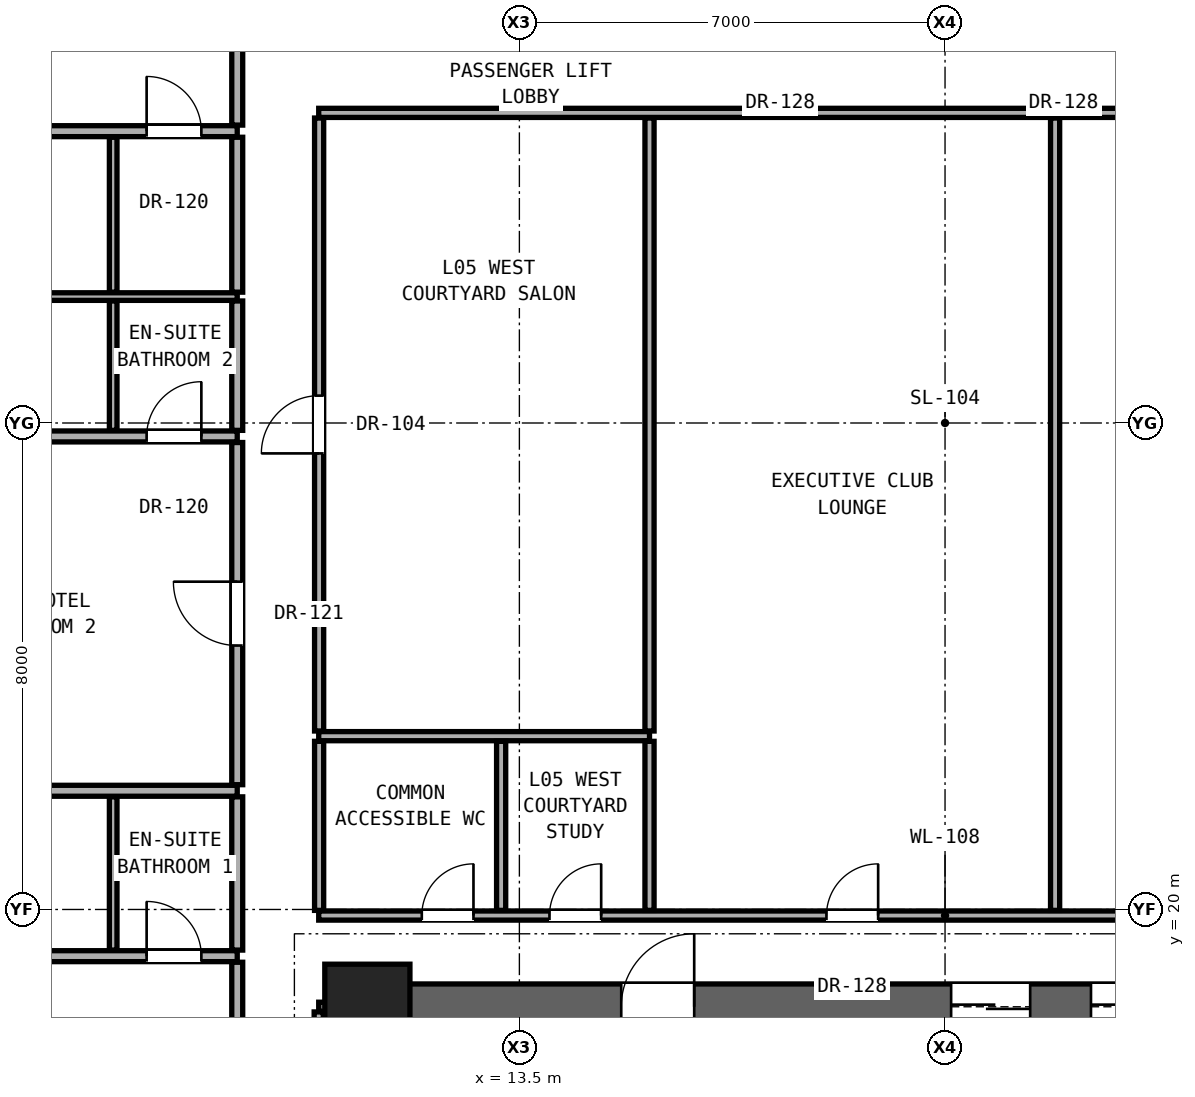
"""IFC4 building model, lengths in metres.
Left out: names, types, materials, properties, quantities, classifications, styles, units other than length and angle.
Written with IfcOpenShell. Run it as: python <this file> out.ifc"""

import sys

from ifc_helpers import new_model, si_unit, direction, frame, frame_2d, origin, origin_2d, place, context, subcontext, project, spatial, rectangle, extrude, element, fill, save


model = new_model("IFC4")
c1 = context("Model", 3, precision=1e-05, world=origin(), true_north=direction((0.0, 1.0)))
c2 = subcontext(c1, "Body", "Model", "MODEL_VIEW")
j1 = project(units=[si_unit("LENGTHUNIT", "METRE"), si_unit("PLANEANGLEUNIT", "RADIAN")], contexts=[c1])
p1 = place(None, origin())
s1 = spatial("IfcSite", under=j1, at=p1, CompositionType="ELEMENT")
p2 = place(p1, origin())
s2 = spatial("IfcBuilding", under=s1, at=p2, CompositionType="ELEMENT")
p3 = place(p2, frame((0.0, 0.0, 22.4)))
s3 = spatial("IfcBuildingStorey", under=s2, at=p3, CompositionType="ELEMENT", Elevation=22.4)
p4 = place(p3, frame((11.0, 18.4, 0.0), z_axis=(0.0, 0.0, 1.0), x_axis=(1.0, 0.0, 0.0)))
e1 = element("IfcColumn", 1, at=p4, inside=s3, PredefinedType="COLUMN", context=c2, shape_type="SweptSolid", body=[
    extrude(rectangle(XDim=1.4, YDim=1.4, at=origin_2d()), origin(), (0.0, 0.0, 1.0), 3.3),
])
p5 = place(p3, frame((11.0, 12.4, 0.0), z_axis=(0.0, 0.0, 1.0), x_axis=(0.0, 1.0, 0.0)))
e2 = element("IfcWall", 2, at=p5, inside=s3, PredefinedType="SHEAR", context=c2, shape_type="SweptSolid", body=[
    extrude(rectangle(XDim=6.0, YDim=0.75, at=frame_2d((3.0, 0.0))), origin(), (0.0, 0.0, 1.0), 3.06),
])
p6 = place(p3, frame((11.0, 18.4, 0.0), z_axis=(0.0, 0.0, 1.0), x_axis=(1.0, 0.0, 0.0)))
e3 = element("IfcWall", 3, at=p6, inside=s3, PredefinedType="SHEAR", context=c2, shape_type="SweptSolid", body=[
    extrude(rectangle(XDim=19.0, YDim=0.75, at=frame_2d((9.5, 0.0))), origin(), (0.0, 0.0, 1.0), 3.06),
])
p7 = place(p6, frame((4.175, 0.0, 0.0)))
e4 = element("IfcOpeningElement", 4, at=p7, cuts=e3, PredefinedType="OPENING", context=c2, shape_type="SweptSolid", body=[
    extrude(rectangle(XDim=1.2, YDim=2.25, at=frame_2d((0.6, 1.125))), frame((0.0, 0.385, 0.0), z_axis=(0.0, -1.0, 0.0), x_axis=(1.0, 0.0, 0.0)), (0.0, 0.0, 1.0), 0.77),
])
p8 = place(p6, frame((9.6, 0.0, 0.0)))
e5 = element("IfcOpeningElement", 5, at=p8, cuts=e3, PredefinedType="OPENING", context=c2, shape_type="SweptSolid", body=[
    extrude(rectangle(XDim=1.3, YDim=2.3, at=frame_2d((0.65, 1.15))), frame((0.0, 0.385, 0.0), z_axis=(0.0, -1.0, 0.0), x_axis=(1.0, 0.0, 0.0)), (0.0, 0.0, 1.0), 0.77),
])
p9 = place(p6, frame((11.9, 0.0, 0.0)))
e6 = element("IfcOpeningElement", 6, at=p9, cuts=e3, PredefinedType="OPENING", context=c2, shape_type="SweptSolid", body=[
    extrude(rectangle(XDim=1.3, YDim=2.3, at=frame_2d((0.65, 1.15))), frame((0.0, 0.385, 0.0), z_axis=(0.0, -1.0, 0.0), x_axis=(1.0, 0.0, 0.0)), (0.0, 0.0, 1.0), 0.77),
])
p10 = place(p6, frame((14.3, 0.0, 0.0)))
e7 = element("IfcOpeningElement", 7, at=p10, cuts=e3, PredefinedType="OPENING", context=c2, shape_type="SweptSolid", body=[
    extrude(rectangle(XDim=1.3, YDim=2.3, at=frame_2d((0.65, 1.15))), frame((0.0, 0.385, 0.0), z_axis=(0.0, -1.0, 0.0), x_axis=(1.0, 0.0, 0.0)), (0.0, 0.0, 1.0), 0.77),
])
p11 = place(p6, frame((16.6, 0.0, 0.0)))
e8 = element("IfcOpeningElement", 8, at=p11, cuts=e3, PredefinedType="OPENING", context=c2, shape_type="SweptSolid", body=[
    extrude(rectangle(XDim=1.3, YDim=2.3, at=frame_2d((0.65, 1.15))), frame((0.0, 0.385, 0.0), z_axis=(0.0, -1.0, 0.0), x_axis=(1.0, 0.0, 0.0)), (0.0, 0.0, 1.0), 0.77),
])
p12 = place(p3, frame((10.2, 18.4, 0.0), z_axis=(0.0, 0.0, 1.0), x_axis=(1.0, 0.0, 0.0)))
e9 = element("IfcWall", 9, at=p12, inside=s3, PredefinedType="PARTITIONING", context=c2, shape_type="SweptSolid", body=[
    extrude(rectangle(XDim=0.43, YDim=0.15, at=frame_2d((0.215, 0.0))), origin(), (0.0, 0.0, 1.0), 2.436),
])
p13 = place(p3, frame((-0.48, 19.232, 0.0), z_axis=(0.0, 0.0, 1.0), x_axis=(1.0, 0.0, 0.0)))
e10 = element("IfcWall", 10, at=p13, inside=s3, PredefinedType="PARTITIONING", context=c2, shape_type="SweptSolid", body=[
    extrude(rectangle(XDim=9.34, YDim=0.18, at=frame_2d((4.67, 0.0))), origin(), (0.0, 0.0, 1.0), 2.125),
])
p14 = place(p13, frame((3.545, 0.0, 0.0)))
e11 = element("IfcOpeningElement", 11, at=p14, cuts=e10, PredefinedType="OPENING", context=c2, shape_type="SweptSolid", body=[
    extrude(rectangle(XDim=0.85, YDim=2.01, at=frame_2d((0.425, 1.005))), frame((0.0, 0.1, 0.0), z_axis=(0.0, -1.0, 0.0), x_axis=(1.0, 0.0, 0.0)), (0.0, 0.0, 1.0), 0.2),
])
p15 = place(p13, frame((7.85, 0.0, 0.0)))
e12 = element("IfcOpeningElement", 12, at=p15, cuts=e10, PredefinedType="OPENING", context=c2, shape_type="SweptSolid", body=[
    extrude(rectangle(XDim=0.9, YDim=2.1, at=frame_2d((0.45, 1.05))), frame((0.0, 0.1, 0.0), z_axis=(0.0, -1.0, 0.0), x_axis=(1.0, 0.0, 0.0)), (0.0, 0.0, 1.0), 0.2),
])
p16 = place(p3, frame((10.2, 19.9, 0.0), z_axis=(0.0, 0.0, 1.0), x_axis=(1.0, 0.0, 0.0)))
e13 = element("IfcWall", 13, at=p16, inside=s3, PredefinedType="PARTITIONING", context=c2, shape_type="SweptSolid", body=[
    extrude(rectangle(XDim=20.6, YDim=0.15, at=frame_2d((10.3, 0.0))), origin(), (0.0, 0.0, 1.0), 2.104),
])
p17 = place(p16, frame((1.695, 0.0, 0.0)))
e14 = element("IfcOpeningElement", 14, at=p17, cuts=e13, PredefinedType="OPENING", context=c2, shape_type="SweptSolid", body=[
    extrude(rectangle(XDim=0.85, YDim=2.01, at=frame_2d((0.425, 1.005))), frame((0.0, 0.085, 0.0), z_axis=(0.0, -1.0, 0.0), x_axis=(1.0, 0.0, 0.0)), (0.0, 0.0, 1.0), 0.17),
])
p18 = place(p16, frame((3.795, 0.0, 0.0)))
e15 = element("IfcOpeningElement", 15, at=p18, cuts=e13, PredefinedType="OPENING", context=c2, shape_type="SweptSolid", body=[
    extrude(rectangle(XDim=0.85, YDim=2.01, at=frame_2d((0.425, 1.005))), frame((0.0, 0.085, 0.0), z_axis=(0.0, -1.0, 0.0), x_axis=(1.0, 0.0, 0.0)), (0.0, 0.0, 1.0), 0.17),
])
p19 = place(p16, frame((8.35, 0.0, 0.0)))
e16 = element("IfcOpeningElement", 16, at=p19, cuts=e13, PredefinedType="OPENING", context=c2, shape_type="SweptSolid", body=[
    extrude(rectangle(XDim=0.85, YDim=2.01, at=frame_2d((0.425, 1.005))), frame((0.0, 0.085, 0.0), z_axis=(0.0, -1.0, 0.0), x_axis=(1.0, 0.0, 0.0)), (0.0, 0.0, 1.0), 0.17),
])
p20 = place(p3, frame((-0.48, 21.952, 0.0), z_axis=(0.0, 0.0, 1.0), x_axis=(1.0, 0.0, 0.0)))
e17 = element("IfcWall", 17, at=p20, inside=s3, PredefinedType="PARTITIONING", context=c2, shape_type="SweptSolid", body=[
    extrude(rectangle(XDim=9.34, YDim=0.18, at=frame_2d((4.67, 0.0))), origin(), (0.0, 0.0, 1.0), 2.125),
])
p21 = place(p3, frame((10.2, 22.85, 0.0), z_axis=(0.0, 0.0, 1.0), x_axis=(1.0, 0.0, 0.0)))
e18 = element("IfcWall", 18, at=p21, inside=s3, PredefinedType="PARTITIONING", context=c2, shape_type="SweptSolid", body=[
    extrude(rectangle(XDim=5.44, YDim=0.15, at=frame_2d((2.72, 0.0))), origin(), (0.0, 0.0, 1.0), 2.104),
])
p22 = place(p3, frame((-0.48, 27.779, 0.0), z_axis=(0.0, 0.0, 1.0), x_axis=(1.0, 0.0, 0.0)))
e19 = element("IfcWall", 19, at=p22, inside=s3, PredefinedType="PARTITIONING", context=c2, shape_type="SweptSolid", body=[
    extrude(rectangle(XDim=9.34, YDim=0.18, at=frame_2d((4.67, 0.0))), origin(), (0.0, 0.0, 1.0), 2.125),
])
p23 = place(p22, frame((3.245, 0.0, 0.0)))
e20 = element("IfcOpeningElement", 20, at=p23, cuts=e19, PredefinedType="OPENING", context=c2, shape_type="SweptSolid", body=[
    extrude(rectangle(XDim=0.85, YDim=2.01, at=frame_2d((0.425, 1.005))), frame((0.0, 0.1, 0.0), z_axis=(0.0, -1.0, 0.0), x_axis=(1.0, 0.0, 0.0)), (0.0, 0.0, 1.0), 0.2),
])
p24 = place(p22, frame((7.85, 0.0, 0.0)))
e21 = element("IfcOpeningElement", 21, at=p24, cuts=e19, PredefinedType="OPENING", context=c2, shape_type="SweptSolid", body=[
    extrude(rectangle(XDim=0.9, YDim=2.1, at=frame_2d((0.45, 1.05))), frame((0.0, 0.1, 0.0), z_axis=(0.0, -1.0, 0.0), x_axis=(1.0, 0.0, 0.0)), (0.0, 0.0, 1.0), 0.2),
])
p25 = place(p3, frame((-0.48, 30.079, 0.0), z_axis=(0.0, 0.0, 1.0), x_axis=(1.0, 0.0, 0.0)))
e22 = element("IfcWall", 22, at=p25, inside=s3, PredefinedType="PARTITIONING", context=c2, shape_type="SweptSolid", body=[
    extrude(rectangle(XDim=9.34, YDim=0.125, at=frame_2d((4.67, 0.0))), origin(), (0.0, 0.0, 1.0), 2.125),
])
p26 = place(p3, frame((-0.48, 32.799, 0.0), z_axis=(0.0, 0.0, 1.0), x_axis=(1.0, 0.0, 0.0)))
e23 = element("IfcWall", 23, at=p26, inside=s3, PredefinedType="PARTITIONING", context=c2, shape_type="SweptSolid", body=[
    extrude(rectangle(XDim=9.34, YDim=0.18, at=frame_2d((4.67, 0.0))), origin(), (0.0, 0.0, 1.0), 2.125),
])
p27 = place(p26, frame((3.545, 0.0, 0.0)))
e24 = element("IfcOpeningElement", 24, at=p27, cuts=e23, PredefinedType="OPENING", context=c2, shape_type="SweptSolid", body=[
    extrude(rectangle(XDim=0.85, YDim=2.01, at=frame_2d((0.425, 1.005))), frame((0.0, 0.1, 0.0), z_axis=(0.0, -1.0, 0.0), x_axis=(1.0, 0.0, 0.0)), (0.0, 0.0, 1.0), 0.2),
])
p28 = place(p26, frame((7.85, 0.0, 0.0)))
e25 = element("IfcOpeningElement", 25, at=p28, cuts=e23, PredefinedType="OPENING", context=c2, shape_type="SweptSolid", body=[
    extrude(rectangle(XDim=0.9, YDim=2.1, at=frame_2d((0.45, 1.05))), frame((0.0, 0.1, 0.0), z_axis=(0.0, -1.0, 0.0), x_axis=(1.0, 0.0, 0.0)), (0.0, 0.0, 1.0), 0.2),
])
p29 = place(p3, frame((10.2, 33.1, 0.0), z_axis=(0.0, 0.0, 1.0), x_axis=(1.0, 0.0, 0.0)))
e26 = element("IfcWall", 26, at=p29, inside=s3, PredefinedType="PARTITIONING", context=c2, shape_type="SweptSolid", body=[
    extrude(rectangle(XDim=20.6, YDim=0.15, at=frame_2d((10.3, 0.0))), origin(), (0.0, 0.0, 1.0), 2.104),
])
p30 = place(p29, frame((15.91, 0.0, 0.0)))
e27 = element("IfcOpeningElement", 27, at=p30, cuts=e26, PredefinedType="OPENING", context=c2, shape_type="SweptSolid", body=[
    extrude(rectangle(XDim=0.85, YDim=2.01, at=frame_2d((0.425, 1.005))), frame((0.0, 0.085, 0.0), z_axis=(0.0, -1.0, 0.0), x_axis=(1.0, 0.0, 0.0)), (0.0, 0.0, 1.0), 0.17),
])
p31 = place(p3, frame((6.82, 19.332, 0.0), z_axis=(0.0, 0.0, 1.0), x_axis=(0.0, 1.0, 0.0)))
e28 = element("IfcWall", 28, at=p31, inside=s3, PredefinedType="PARTITIONING", context=c2, shape_type="SweptSolid", body=[
    extrude(rectangle(XDim=2.52, YDim=0.125, at=frame_2d((1.26, 0.0))), origin(), (0.0, 0.0, 1.0), 3.06),
])
p32 = place(p3, frame((6.82, 27.879, 0.0), z_axis=(0.0, 0.0, 1.0), x_axis=(0.0, 1.0, 0.0)))
e29 = element("IfcWall", 29, at=p32, inside=s3, PredefinedType="PARTITIONING", context=c2, shape_type="SweptSolid", body=[
    extrude(rectangle(XDim=2.128, YDim=0.125, at=frame_2d((1.064, 0.0))), origin(), (0.0, 0.0, 1.0), 3.06),
])
p33 = place(p3, frame((6.82, 30.152, 0.0), z_axis=(0.0, 0.0, 1.0), x_axis=(0.0, 1.0, 0.0)))
e30 = element("IfcWall", 30, at=p33, inside=s3, PredefinedType="PARTITIONING", context=c2, shape_type="SweptSolid", body=[
    extrude(rectangle(XDim=2.547, YDim=0.125, at=frame_2d((1.274, 0.0))), origin(), (0.0, 0.0, 1.0), 2.279),
])
p34 = place(p3, frame((8.86, 14.5, 0.0), z_axis=(0.0, 0.0, 1.0), x_axis=(0.0, 1.0, 0.0)))
e31 = element("IfcWall", 31, at=p34, inside=s3, PredefinedType="PARTITIONING", context=c2, shape_type="SweptSolid", body=[
    extrude(rectangle(XDim=4.632, YDim=0.18, at=frame_2d((2.316, 0.0))), origin(), (0.0, 0.0, 1.0), 2.436),
])
p35 = place(p34, frame((2.391, 0.0, 0.0)))
e32 = element("IfcOpeningElement", 32, at=p35, cuts=e31, PredefinedType="OPENING", context=c2, shape_type="SweptSolid", body=[
    extrude(rectangle(XDim=1.05, YDim=2.2, at=frame_2d((0.525, 1.1))), frame((0.0, 0.1, 0.0), z_axis=(0.0, -1.0, 0.0), x_axis=(1.0, 0.0, 0.0)), (0.0, 0.0, 1.0), 0.2),
])
p36 = place(p3, frame((8.86, 19.332, 0.0), z_axis=(0.0, 0.0, 1.0), x_axis=(0.0, 1.0, 0.0)))
e33 = element("IfcWall", 33, at=p36, inside=s3, PredefinedType="PARTITIONING", context=c2, shape_type="SweptSolid", body=[
    extrude(rectangle(XDim=2.52, YDim=0.18, at=frame_2d((1.26, 0.0))), origin(), (0.0, 0.0, 1.0), 3.06),
])
p37 = place(p3, frame((8.86, 22.052, 0.0), z_axis=(0.0, 0.0, 1.0), x_axis=(0.0, 1.0, 0.0)))
e34 = element("IfcWall", 34, at=p37, inside=s3, PredefinedType="PARTITIONING", context=c2, shape_type="SweptSolid", body=[
    extrude(rectangle(XDim=5.627, YDim=0.18, at=frame_2d((2.813, 0.0))), origin(), (0.0, 0.0, 1.0), 2.279),
])
p38 = place(p37, frame((2.289, 0.0, 0.0)))
e35 = element("IfcOpeningElement", 35, at=p38, cuts=e34, PredefinedType="OPENING", context=c2, shape_type="SweptSolid", body=[
    extrude(rectangle(XDim=1.05, YDim=2.2, at=frame_2d((0.525, 1.1))), frame((0.0, 0.1, 0.0), z_axis=(0.0, -1.0, 0.0), x_axis=(1.0, 0.0, 0.0)), (0.0, 0.0, 1.0), 0.2),
])
p39 = place(p3, frame((8.86, 27.879, 0.0), z_axis=(0.0, 0.0, 1.0), x_axis=(0.0, 1.0, 0.0)))
e36 = element("IfcWall", 36, at=p39, inside=s3, PredefinedType="PARTITIONING", context=c2, shape_type="SweptSolid", body=[
    extrude(rectangle(XDim=2.128, YDim=0.18, at=frame_2d((1.064, 0.0))), origin(), (0.0, 0.0, 1.0), 3.06),
])
p40 = place(p3, frame((8.86, 30.152, 0.0), z_axis=(0.0, 0.0, 1.0), x_axis=(0.0, 1.0, 0.0)))
e37 = element("IfcWall", 37, at=p40, inside=s3, PredefinedType="PARTITIONING", context=c2, shape_type="SweptSolid", body=[
    extrude(rectangle(XDim=2.547, YDim=0.18, at=frame_2d((1.274, 0.0))), origin(), (0.0, 0.0, 1.0), 2.279),
])
p41 = place(p3, frame((8.86, 32.899, 0.0), z_axis=(0.0, 0.0, 1.0), x_axis=(0.0, 1.0, 0.0)))
e38 = element("IfcWall", 38, at=p41, inside=s3, PredefinedType="PARTITIONING", context=c2, shape_type="SweptSolid", body=[
    extrude(rectangle(XDim=8.601, YDim=0.18, at=frame_2d((4.301, 0.0))), origin(), (0.0, 0.0, 1.0), 2.436),
])
p42 = place(p41, frame((3.775, 0.0, 0.0)))
e39 = element("IfcOpeningElement", 39, at=p42, cuts=e38, PredefinedType="OPENING", context=c2, shape_type="SweptSolid", body=[
    extrude(rectangle(XDim=1.05, YDim=2.2, at=frame_2d((0.525, 1.1))), frame((0.0, 0.1, 0.0), z_axis=(0.0, -1.0, 0.0), x_axis=(1.0, 0.0, 0.0)), (0.0, 0.0, 1.0), 0.2),
])
p43 = place(p3, frame((10.2, 12.335, 0.0), z_axis=(0.0, 0.0, 1.0), x_axis=(0.0, 1.0, 0.0)))
e40 = element("IfcWall", 40, at=p43, inside=s3, PredefinedType="PARTITIONING", context=c2, shape_type="SweptSolid", body=[
    extrude(rectangle(XDim=5.98, YDim=0.15, at=frame_2d((2.99, 0.0))), origin(), (0.0, 0.0, 1.0), 2.436),
])
p44 = place(p3, frame((10.207, 19.985, 0.0), z_axis=(0.0, 0.0, 1.0), x_axis=(0.0, 1.0, 0.0)))
e41 = element("IfcWall", 41, at=p44, inside=s3, PredefinedType="PARTITIONING", context=c2, shape_type="SweptSolid", body=[
    extrude(rectangle(XDim=2.78, YDim=0.15, at=frame_2d((1.39, 0.0))), origin(), (0.0, 0.0, 1.0), 3.06),
])
p45 = place(p3, frame((10.207, 22.935, 0.0), z_axis=(0.0, 0.0, 1.0), x_axis=(0.0, 1.0, 0.0)))
e42 = element("IfcWall", 42, at=p45, inside=s3, PredefinedType="PARTITIONING", context=c2, shape_type="SweptSolid", body=[
    extrude(rectangle(XDim=10.08, YDim=0.15, at=frame_2d((5.04, 0.0))), origin(), (0.0, 0.0, 1.0), 2.279),
])
p46 = place(p45, frame((4.565, 0.0, 0.0)))
e43 = element("IfcOpeningElement", 43, at=p46, cuts=e42, PredefinedType="OPENING", context=c2, shape_type="SweptSolid", body=[
    extrude(rectangle(XDim=0.95, YDim=2.15, at=frame_2d((0.475, 1.075))), frame((0.0, 0.085, 0.0), z_axis=(0.0, -1.0, 0.0), x_axis=(1.0, 0.0, 0.0)), (0.0, 0.0, 1.0), 0.17),
])
p47 = place(p3, frame((13.2, 19.985, 0.0), z_axis=(0.0, 0.0, 1.0), x_axis=(0.0, 1.0, 0.0)))
e44 = element("IfcWall", 44, at=p47, inside=s3, PredefinedType="PARTITIONING", context=c2, shape_type="SweptSolid", body=[
    extrude(rectangle(XDim=2.78, YDim=0.15, at=frame_2d((1.39, 0.0))), origin(), (0.0, 0.0, 1.0), 3.06),
])
p48 = place(p3, frame((15.64, 19.985, 0.0), z_axis=(0.0, 0.0, 1.0), x_axis=(0.0, 1.0, 0.0)))
e45 = element("IfcWall", 45, at=p48, inside=s3, PredefinedType="PARTITIONING", context=c2, shape_type="SweptSolid", body=[
    extrude(rectangle(XDim=2.78, YDim=0.15, at=frame_2d((1.39, 0.0))), origin(), (0.0, 0.0, 1.0), 2.589),
])
p49 = place(p3, frame((15.64, 22.935, 0.0), z_axis=(0.0, 0.0, 1.0), x_axis=(0.0, 1.0, 0.0)))
e46 = element("IfcWall", 46, at=p49, inside=s3, PredefinedType="PARTITIONING", context=c2, shape_type="SweptSolid", body=[
    extrude(rectangle(XDim=10.08, YDim=0.15, at=frame_2d((5.04, 0.0))), origin(), (0.0, 0.0, 1.0), 2.104),
])
p50 = place(p3, frame((22.31, 19.985, 0.0), z_axis=(0.0, 0.0, 1.0), x_axis=(0.0, 1.0, 0.0)))
e47 = element("IfcWall", 47, at=p50, inside=s3, PredefinedType="PARTITIONING", context=c2, shape_type="SweptSolid", body=[
    extrude(rectangle(XDim=13.03, YDim=0.15, at=frame_2d((6.515, 0.0))), origin(), (0.0, 0.0, 1.0), 2.104),
])
p51 = place(p7, origin())
e48 = element("IfcDoor", 48, at=p51, inside=s3, OperationType="SINGLE_SWING_RIGHT", PredefinedType="DOOR", context=c2, shape_type="SweptSolid", body=[
    extrude(rectangle(XDim=1.2, YDim=2.25, at=frame_2d((0.6, 1.125))), frame((0.0, 0.025, 0.0), z_axis=(0.0, -1.0, 0.0), x_axis=(1.0, 0.0, 0.0)), (0.0, 0.0, 1.0), 0.05),
])
fill(e4, e48)
p52 = place(p17, origin())
e49 = element("IfcDoor", 49, at=p52, inside=s3, OperationType="SINGLE_SWING_RIGHT", PredefinedType="DOOR", context=c2, shape_type="SweptSolid", body=[
    extrude(rectangle(XDim=0.85, YDim=2.01, at=frame_2d((0.425, 1.005))), frame((0.0, 0.025, 0.0), z_axis=(0.0, -1.0, 0.0), x_axis=(1.0, 0.0, 0.0)), (0.0, 0.0, 1.0), 0.05),
])
fill(e14, e49)
p53 = place(p15, origin())
e50 = element("IfcDoor", 50, at=p53, inside=s3, OperationType="SINGLE_SWING_LEFT", PredefinedType="DOOR", context=c2, shape_type="SweptSolid", body=[
    extrude(rectangle(XDim=0.9, YDim=2.1, at=frame_2d((0.45, 1.05))), frame((0.0, 0.025, 0.0), z_axis=(0.0, -1.0, 0.0), x_axis=(1.0, 0.0, 0.0)), (0.0, 0.0, 1.0), 0.05),
])
fill(e12, e50)
p54 = place(p38, origin())
e51 = element("IfcDoor", 51, at=p54, inside=s3, OperationType="SINGLE_SWING_RIGHT", PredefinedType="DOOR", context=c2, shape_type="SweptSolid", body=[
    extrude(rectangle(XDim=1.05, YDim=2.2, at=frame_2d((0.525, 1.1))), frame((0.0, 0.025, 0.0), z_axis=(0.0, -1.0, 0.0), x_axis=(1.0, 0.0, 0.0)), (0.0, 0.0, 1.0), 0.05),
])
fill(e35, e51)
p55 = place(p24, origin())
e52 = element("IfcDoor", 52, at=p55, inside=s3, OperationType="SINGLE_SWING_RIGHT", PredefinedType="DOOR", context=c2, shape_type="SweptSolid", body=[
    extrude(rectangle(XDim=0.9, YDim=2.1, at=frame_2d((0.45, 1.05))), frame((0.0, 0.025, 0.0), z_axis=(0.0, -1.0, 0.0), x_axis=(1.0, 0.0, 0.0)), (0.0, 0.0, 1.0), 0.05),
])
fill(e21, e52)
p56 = place(p28, origin())
e53 = element("IfcDoor", 53, at=p56, inside=s3, OperationType="SINGLE_SWING_LEFT", PredefinedType="DOOR", context=c2, shape_type="SweptSolid", body=[
    extrude(rectangle(XDim=0.9, YDim=2.1, at=frame_2d((0.45, 1.05))), frame((0.0, 0.025, 0.0), z_axis=(0.0, -1.0, 0.0), x_axis=(1.0, 0.0, 0.0)), (0.0, 0.0, 1.0), 0.05),
])
fill(e25, e53)
p57 = place(p18, origin())
e54 = element("IfcDoor", 54, at=p57, inside=s3, OperationType="SINGLE_SWING_RIGHT", PredefinedType="DOOR", context=c2, shape_type="SweptSolid", body=[
    extrude(rectangle(XDim=0.85, YDim=2.01, at=frame_2d((0.425, 1.005))), frame((0.0, 0.025, 0.0), z_axis=(0.0, -1.0, 0.0), x_axis=(1.0, 0.0, 0.0)), (0.0, 0.0, 1.0), 0.05),
])
fill(e15, e54)
p58 = place(p46, origin())
e55 = element("IfcDoor", 55, at=p58, inside=s3, OperationType="SINGLE_SWING_LEFT", PredefinedType="DOOR", context=c2, shape_type="SweptSolid", body=[
    extrude(rectangle(XDim=0.95, YDim=2.15, at=frame_2d((0.475, 1.075))), frame((0.0, 0.025, 0.0), z_axis=(0.0, -1.0, 0.0), x_axis=(1.0, 0.0, 0.0)), (0.0, 0.0, 1.0), 0.05),
])
fill(e43, e55)
p59 = place(p19, origin())
e56 = element("IfcDoor", 56, at=p59, inside=s3, OperationType="SINGLE_SWING_RIGHT", PredefinedType="DOOR", context=c2, shape_type="SweptSolid", body=[
    extrude(rectangle(XDim=0.85, YDim=2.01, at=frame_2d((0.425, 1.005))), frame((0.0, 0.025, 0.0), z_axis=(0.0, -1.0, 0.0), x_axis=(1.0, 0.0, 0.0)), (0.0, 0.0, 1.0), 0.05),
])
fill(e16, e56)
p60 = place(p8, origin())
e57 = element("IfcDoor", 57, at=p60, inside=s3, OperationType="DOUBLE_DOOR_SLIDING", PredefinedType="DOOR", context=c2, shape_type="SweptSolid", body=[
    extrude(rectangle(XDim=1.3, YDim=2.3, at=frame_2d((0.65, 1.15))), frame((0.0, 0.025, 0.0), z_axis=(0.0, -1.0, 0.0), x_axis=(1.0, 0.0, 0.0)), (0.0, 0.0, 1.0), 0.05),
])
fill(e5, e57)
p61 = place(p9, origin())
e58 = element("IfcDoor", 58, at=p61, inside=s3, OperationType="DOUBLE_DOOR_SLIDING", PredefinedType="DOOR", context=c2, shape_type="SweptSolid", body=[
    extrude(rectangle(XDim=1.3, YDim=2.3, at=frame_2d((0.65, 1.15))), frame((0.0, 0.025, 0.0), z_axis=(0.0, -1.0, 0.0), x_axis=(1.0, 0.0, 0.0)), (0.0, 0.0, 1.0), 0.05),
])
fill(e6, e58)
save(model, sys.argv[1])
